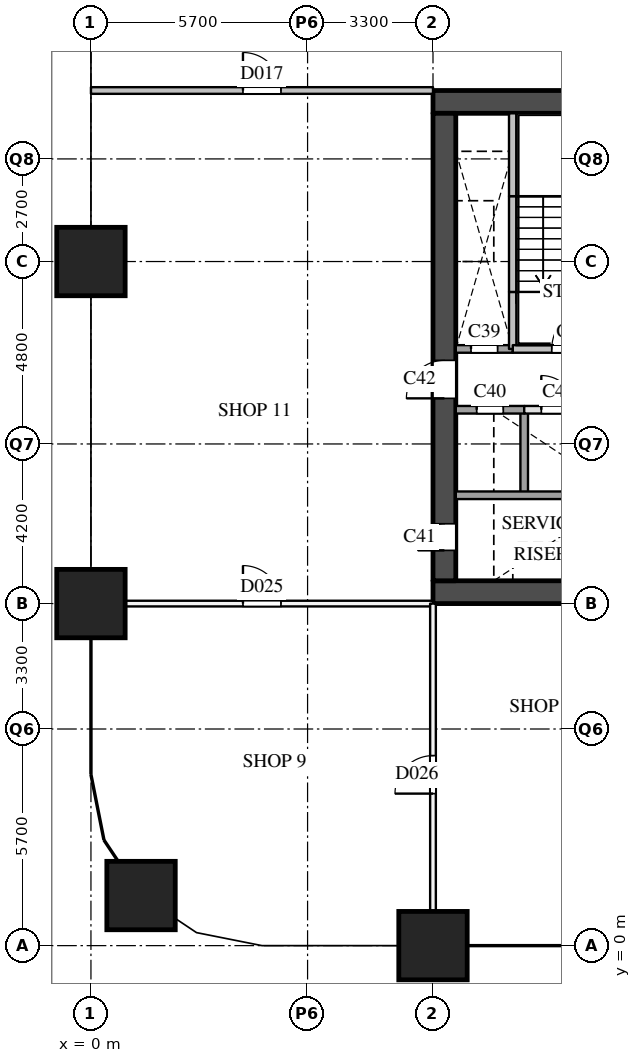
"""IFC4 building model, lengths in metres.
Left out: names, types, materials, properties, quantities, classifications, styles, units other than length and angle.
Written with IfcOpenShell. Run it as: python <this file> out.ifc"""

import sys

from ifc_helpers import new_model, si_unit, direction, frame, frame_2d, origin, origin_2d, place, context, subcontext, project, spatial, rectangle, extrude, element, fill, save


model = new_model("IFC4")
c1 = context("Model", 3, precision=1e-05, world=origin(), true_north=direction((0.0, 1.0)))
c2 = subcontext(c1, "Body", "Model", "MODEL_VIEW")
j1 = project(units=[si_unit("LENGTHUNIT", "METRE"), si_unit("PLANEANGLEUNIT", "RADIAN")], contexts=[c1])
p1 = place(None, origin())
s1 = spatial("IfcSite", under=j1, at=p1, CompositionType="ELEMENT")
p2 = place(p1, origin())
s2 = spatial("IfcBuilding", under=s1, at=p2, CompositionType="ELEMENT")
p3 = place(p2, frame((0.0, 0.0, 14.0)))
s3 = spatial("IfcBuildingStorey", under=s2, at=p3, CompositionType="ELEMENT", Elevation=14.0)
for number, where, z_axis, x_axis in (
    (1, (1.318, 1.318, 0.0), (0.0, 0.0, 1.0), (1.0, 0.0, 0.0)),
    (2, (0.0, 9.0, 0.0), (0.0, 0.0, 1.0), (1.0, 0.0, 0.0)),
    (3, (0.0, 18.0, 0.0), (0.0, 0.0, 1.0), (1.0, 0.0, 0.0)),
    (4, (9.0, 0.0, 0.0), (0.0, 0.0, 1.0), (1.0, 0.0, 0.0)),
):
    element("IfcColumn", number, at=place(p3, frame(where, z_axis=z_axis, x_axis=x_axis)), inside=s3, PredefinedType="COLUMN", context=c2, shape_type="SweptSolid", body=[
        extrude(rectangle(XDim=1.8, YDim=1.8, at=origin_2d()), origin(), (0.0, 0.0, 1.0), 7.0),
    ])
for number, where, z_axis, x_axis in (
    (5, (9.0, 9.3, 0.0), (0.0, 0.0, 1.0), (1.0, 0.0, 0.0)),
    (6, (9.0, 22.2, 0.0), (0.0, 0.0, 1.0), (1.0, 0.0, 0.0)),
):
    element("IfcWall", number, at=place(p3, frame(where, z_axis=z_axis, x_axis=x_axis)), inside=s3, PredefinedType="SHEAR", context=c2, shape_type="SweptSolid", body=[
        extrude(rectangle(XDim=9.0, YDim=0.6, at=frame_2d((4.5, 0.0))), origin(), (0.0, 0.0, 1.0), 6.59),
    ])
p4 = place(p3, frame((9.3, 9.6, 0.0), z_axis=(0.0, 0.0, 1.0), x_axis=(0.0, 1.0, 0.0)))
e7 = element("IfcWall", 7, at=p4, inside=s3, PredefinedType="SHEAR", context=c2, shape_type="SweptSolid", body=[
    extrude(rectangle(XDim=12.3, YDim=0.6, at=frame_2d((6.15, 0.0))), origin(), (0.0, 0.0, 1.0), 6.59),
])
p5 = place(p4, frame((0.8, 0.0, 0.0)))
e8 = element("IfcOpeningElement", 8, at=p5, cuts=e7, PredefinedType="OPENING", context=c2, shape_type="SweptSolid", body=[
    extrude(rectangle(XDim=0.7, YDim=2.1, at=frame_2d((0.35, 1.05))), frame((0.0, 0.31, 0.0), z_axis=(0.0, -1.0, 0.0), x_axis=(1.0, 0.0, 0.0)), (0.0, 0.0, 1.0), 0.62),
])
p6 = place(p4, frame((4.8, 0.0, 0.0)))
e9 = element("IfcOpeningElement", 9, at=p6, cuts=e7, PredefinedType="OPENING", context=c2, shape_type="SweptSolid", body=[
    extrude(rectangle(XDim=1.0, YDim=2.1, at=frame_2d((0.5, 1.05))), frame((0.0, 0.31, 0.0), z_axis=(0.0, -1.0, 0.0), x_axis=(1.0, 0.0, 0.0)), (0.0, 0.0, 1.0), 0.62),
])
p7 = place(p3, frame((11.1, 15.7, 0.0), z_axis=(0.0, 0.0, 1.0), x_axis=(0.0, 1.0, 0.0)))
e10 = element("IfcWall", 10, at=p7, inside=s3, PredefinedType="SOLIDWALL", context=c2, shape_type="SweptSolid", body=[
    extrude(rectangle(XDim=1.5, YDim=0.2, at=frame_2d((0.75, 0.0))), origin(), (0.0, 0.0, 1.0), 6.59),
])
p8 = place(p3, frame((11.1, 17.2, 0.0), z_axis=(0.0, 0.0, 1.0), x_axis=(0.0, 1.0, 0.0)))
e11 = element("IfcWall", 11, at=p8, inside=s3, PredefinedType="SOLIDWALL", context=c2, shape_type="SweptSolid", body=[
    extrude(rectangle(XDim=2.52, YDim=0.2, at=frame_2d((1.26, 0.0))), origin(), (0.0, 0.0, 1.0), 6.59),
])
p9 = place(p3, frame((11.1, 19.72, 0.0), z_axis=(0.0, 0.0, 1.0), x_axis=(0.0, 1.0, 0.0)))
e12 = element("IfcWall", 12, at=p9, inside=s3, PredefinedType="SOLIDWALL", context=c2, shape_type="SweptSolid", body=[
    extrude(rectangle(XDim=2.18, YDim=0.2, at=frame_2d((1.09, 0.0))), origin(), (0.0, 0.0, 1.0), 6.59),
])
p10 = place(p3, frame((11.4, 11.9, 0.0), z_axis=(0.0, 0.0, 1.0), x_axis=(0.0, 1.0, 0.0)))
e13 = element("IfcWall", 13, at=p10, inside=s3, PredefinedType="SOLIDWALL", context=c2, shape_type="SweptSolid", body=[
    extrude(rectangle(XDim=2.2, YDim=0.2, at=frame_2d((1.1, 0.0))), origin(), (0.0, 0.0, 1.0), 6.59),
])
p11 = place(p3, frame((9.6, 11.85, 0.0), z_axis=(0.0, 0.0, 1.0), x_axis=(1.0, 0.0, 0.0)))
e14 = element("IfcWall", 14, at=p11, inside=s3, PredefinedType="SOLIDWALL", context=c2, shape_type="SweptSolid", body=[
    extrude(rectangle(XDim=7.8, YDim=0.2, at=frame_2d((3.9, 0.0))), origin(), (0.0, 0.0, 1.0), 6.59),
])
p12 = place(p3, frame((11.4, 14.1, 0.0), z_axis=(0.0, 0.0, 1.0), x_axis=(1.0, 0.0, 0.0)))
e15 = element("IfcWall", 15, at=p12, inside=s3, PredefinedType="PARTITIONING", context=c2, shape_type="SweptSolid", body=[
    extrude(rectangle(XDim=6.0, YDim=0.2, at=frame_2d((3.0, 0.0))), origin(), (0.0, 0.0, 1.0), 6.59),
])
p13 = place(p12, frame((0.45, 0.0, 0.0)))
e16 = element("IfcOpeningElement", 16, at=p13, cuts=e15, PredefinedType="OPENING", context=c2, shape_type="SweptSolid", body=[
    extrude(rectangle(XDim=0.9, YDim=2.1, at=frame_2d((0.45, 1.05))), frame((0.0, 0.11, 0.0), z_axis=(0.0, -1.0, 0.0), x_axis=(1.0, 0.0, 0.0)), (0.0, 0.0, 1.0), 0.22),
])
p14 = place(p12, frame((3.45, 0.0, 0.0)))
e17 = element("IfcOpeningElement", 17, at=p14, cuts=e15, PredefinedType="OPENING", context=c2, shape_type="SweptSolid", body=[
    extrude(rectangle(XDim=0.9, YDim=2.1, at=frame_2d((0.45, 1.05))), frame((0.0, 0.11, 0.0), z_axis=(0.0, -1.0, 0.0), x_axis=(1.0, 0.0, 0.0)), (0.0, 0.0, 1.0), 0.22),
])
p15 = place(p3, frame((9.6, 14.1, 0.0), z_axis=(0.0, 0.0, 1.0), x_axis=(1.0, 0.0, 0.0)))
e18 = element("IfcWall", 18, at=p15, inside=s3, PredefinedType="SOLIDWALL", context=c2, shape_type="SweptSolid", body=[
    extrude(rectangle(XDim=1.8, YDim=0.2, at=frame_2d((0.9, 0.0))), origin(), (0.0, 0.0, 1.0), 6.59),
])
p16 = place(p15, frame((0.55, 0.0, 0.0)))
e19 = element("IfcOpeningElement", 19, at=p16, cuts=e18, PredefinedType="OPENING", context=c2, shape_type="SweptSolid", body=[
    extrude(rectangle(XDim=0.7, YDim=2.1, at=frame_2d((0.35, 1.05))), frame((0.0, 0.11, 0.0), z_axis=(0.0, -1.0, 0.0), x_axis=(1.0, 0.0, 0.0)), (0.0, 0.0, 1.0), 0.22),
])
p17 = place(p3, frame((9.6, 15.7, 0.0), z_axis=(0.0, 0.0, 1.0), x_axis=(1.0, 0.0, 0.0)))
e20 = element("IfcWall", 20, at=p17, inside=s3, PredefinedType="SOLIDWALL", context=c2, shape_type="SweptSolid", body=[
    extrude(rectangle(XDim=1.5, YDim=0.2, at=frame_2d((0.75, 0.0))), origin(), (0.0, 0.0, 1.0), 6.59),
])
p18 = place(p17, frame((0.4, 0.0, 0.0)))
e21 = element("IfcOpeningElement", 21, at=p18, cuts=e20, PredefinedType="OPENING", context=c2, shape_type="SweptSolid", body=[
    extrude(rectangle(XDim=0.7, YDim=2.1, at=frame_2d((0.35, 1.05))), frame((0.0, 0.11, 0.0), z_axis=(0.0, -1.0, 0.0), x_axis=(1.0, 0.0, 0.0)), (0.0, 0.0, 1.0), 0.22),
])
p19 = place(p3, frame((11.1, 15.7, 0.0), z_axis=(0.0, 0.0, 1.0), x_axis=(1.0, 0.0, 0.0)))
e22 = element("IfcWall", 22, at=p19, inside=s3, PredefinedType="SOLIDWALL", context=c2, shape_type="SweptSolid", body=[
    extrude(rectangle(XDim=3.05, YDim=0.2, at=frame_2d((1.525, 0.0))), origin(), (0.0, 0.0, 1.0), 6.59),
])
p20 = place(p19, frame((1.025, 0.0, 0.0)))
e23 = element("IfcOpeningElement", 23, at=p20, cuts=e22, PredefinedType="OPENING", context=c2, shape_type="SweptSolid", body=[
    extrude(rectangle(XDim=1.1, YDim=2.1, at=frame_2d((0.55, 1.05))), frame((0.0, 0.11, 0.0), z_axis=(0.0, -1.0, 0.0), x_axis=(1.0, 0.0, 0.0)), (0.0, 0.0, 1.0), 0.22),
])
p21 = place(p3, frame((0.0, 22.5, 0.0), z_axis=(0.0, 0.0, 1.0), x_axis=(1.0, 0.0, 0.0)))
e24 = element("IfcWall", 24, at=p21, inside=s3, PredefinedType="PARTITIONING", context=c2, shape_type="SweptSolid", body=[
    extrude(rectangle(XDim=9.0, YDim=0.175, at=frame_2d((4.5, 0.0))), origin(), (0.0, 0.0, 1.0), 5.59),
])
p22 = place(p21, frame((4.0, 0.0, 0.0)))
e25 = element("IfcOpeningElement", 25, at=p22, cuts=e24, PredefinedType="OPENING", context=c2, shape_type="SweptSolid", body=[
    extrude(rectangle(XDim=1.0, YDim=2.1, at=frame_2d((0.5, 1.05))), frame((0.0, 0.097, 0.0), z_axis=(0.0, -1.0, 0.0), x_axis=(1.0, 0.0, 0.0)), (0.0, 0.0, 1.0), 0.195),
])
p23 = place(p3, frame((0.0, 9.0, 0.0), z_axis=(0.0, 0.0, 1.0), x_axis=(1.0, 0.0, 0.0)))
e26 = element("IfcWall", 26, at=p23, inside=s3, PredefinedType="PARTITIONING", context=c2, shape_type="SweptSolid", body=[
    extrude(rectangle(XDim=9.0, YDim=0.15, at=frame_2d((4.5, 0.0))), origin(), (0.0, 0.0, 1.0), 6.59),
])
p24 = place(p23, frame((4.0, 0.0, 0.0)))
e27 = element("IfcOpeningElement", 27, at=p24, cuts=e26, PredefinedType="OPENING", context=c2, shape_type="SweptSolid", body=[
    extrude(rectangle(XDim=1.0, YDim=2.1, at=frame_2d((0.5, 1.05))), frame((0.0, 0.085, 0.0), z_axis=(0.0, -1.0, 0.0), x_axis=(1.0, 0.0, 0.0)), (0.0, 0.0, 1.0), 0.17),
])
p25 = place(p3, frame((9.0, 0.0, 0.0), z_axis=(0.0, 0.0, 1.0), x_axis=(0.0, 1.0, 0.0)))
e28 = element("IfcWall", 28, at=p25, inside=s3, PredefinedType="PARTITIONING", context=c2, shape_type="SweptSolid", body=[
    extrude(rectangle(XDim=9.0, YDim=0.15, at=frame_2d((4.5, 0.0))), origin(), (0.0, 0.0, 1.0), 6.59),
])
p26 = place(p25, frame((4.0, 0.0, 0.0)))
e29 = element("IfcOpeningElement", 29, at=p26, cuts=e28, PredefinedType="OPENING", context=c2, shape_type="SweptSolid", body=[
    extrude(rectangle(XDim=1.0, YDim=2.1, at=frame_2d((0.5, 1.05))), frame((0.0, 0.085, 0.0), z_axis=(0.0, -1.0, 0.0), x_axis=(1.0, 0.0, 0.0)), (0.0, 0.0, 1.0), 0.17),
])
p27 = place(p20, origin())
e30 = element("IfcDoor", 30, at=p27, inside=s3, OperationType="SINGLE_SWING_RIGHT", PredefinedType="DOOR", context=c2, shape_type="SweptSolid", body=[
    extrude(rectangle(XDim=1.1, YDim=2.1, at=frame_2d((0.55, 1.05))), frame((0.0, 0.025, 0.0), z_axis=(0.0, -1.0, 0.0), x_axis=(1.0, 0.0, 0.0)), (0.0, 0.0, 1.0), 0.05),
])
fill(e23, e30)
p28 = place(p18, origin())
e31 = element("IfcDoor", 31, at=p28, inside=s3, OperationType="SINGLE_SWING_LEFT", PredefinedType="DOOR", context=c2, shape_type="SweptSolid", body=[
    extrude(rectangle(XDim=0.7, YDim=2.1, at=frame_2d((0.35, 1.05))), frame((0.0, 0.025, 0.0), z_axis=(0.0, -1.0, 0.0), x_axis=(1.0, 0.0, 0.0)), (0.0, 0.0, 1.0), 0.05),
])
fill(e21, e31)
p29 = place(p16, origin())
e32 = element("IfcDoor", 32, at=p29, inside=s3, OperationType="SINGLE_SWING_LEFT", PredefinedType="DOOR", context=c2, shape_type="SweptSolid", body=[
    extrude(rectangle(XDim=0.7, YDim=2.1, at=frame_2d((0.35, 1.05))), frame((0.0, 0.025, 0.0), z_axis=(0.0, -1.0, 0.0), x_axis=(1.0, 0.0, 0.0)), (0.0, 0.0, 1.0), 0.05),
])
fill(e19, e32)
p30 = place(p5, origin())
e33 = element("IfcDoor", 33, at=p30, inside=s3, OperationType="SINGLE_SWING_LEFT", PredefinedType="DOOR", context=c2, shape_type="SweptSolid", body=[
    extrude(rectangle(XDim=0.7, YDim=2.1, at=frame_2d((0.35, 1.05))), frame((0.0, 0.025, 0.0), z_axis=(0.0, -1.0, 0.0), x_axis=(1.0, 0.0, 0.0)), (0.0, 0.0, 1.0), 0.05),
])
fill(e8, e33)
p31 = place(p6, origin())
e34 = element("IfcDoor", 34, at=p31, inside=s3, OperationType="SINGLE_SWING_LEFT", PredefinedType="DOOR", context=c2, shape_type="SweptSolid", body=[
    extrude(rectangle(XDim=1.0, YDim=2.1, at=frame_2d((0.5, 1.05))), frame((0.0, 0.025, 0.0), z_axis=(0.0, -1.0, 0.0), x_axis=(1.0, 0.0, 0.0)), (0.0, 0.0, 1.0), 0.05),
])
fill(e9, e34)
p32 = place(p13, origin())
e35 = element("IfcDoor", 35, at=p32, inside=s3, OperationType="SINGLE_SWING_LEFT", PredefinedType="DOOR", context=c2, shape_type="SweptSolid", body=[
    extrude(rectangle(XDim=0.9, YDim=2.1, at=frame_2d((0.45, 1.05))), frame((0.0, 0.025, 0.0), z_axis=(0.0, -1.0, 0.0), x_axis=(1.0, 0.0, 0.0)), (0.0, 0.0, 1.0), 0.05),
])
fill(e16, e35)
p33 = place(p22, origin())
e36 = element("IfcDoor", 36, at=p33, inside=s3, OperationType="SINGLE_SWING_LEFT", PredefinedType="DOOR", context=c2, shape_type="SweptSolid", body=[
    extrude(rectangle(XDim=1.0, YDim=2.1, at=frame_2d((0.5, 1.05))), frame((0.0, 0.025, 0.0), z_axis=(0.0, -1.0, 0.0), x_axis=(1.0, 0.0, 0.0)), (0.0, 0.0, 1.0), 0.05),
])
fill(e25, e36)
p34 = place(p24, origin())
e37 = element("IfcDoor", 37, at=p34, inside=s3, OperationType="SINGLE_SWING_LEFT", PredefinedType="DOOR", context=c2, shape_type="SweptSolid", body=[
    extrude(rectangle(XDim=1.0, YDim=2.1, at=frame_2d((0.5, 1.05))), frame((0.0, 0.025, 0.0), z_axis=(0.0, -1.0, 0.0), x_axis=(1.0, 0.0, 0.0)), (0.0, 0.0, 1.0), 0.05),
])
fill(e27, e37)
p35 = place(p26, origin())
e38 = element("IfcDoor", 38, at=p35, inside=s3, OperationType="SINGLE_SWING_LEFT", PredefinedType="DOOR", context=c2, shape_type="SweptSolid", body=[
    extrude(rectangle(XDim=1.0, YDim=2.1, at=frame_2d((0.5, 1.05))), frame((0.0, 0.025, 0.0), z_axis=(0.0, -1.0, 0.0), x_axis=(1.0, 0.0, 0.0)), (0.0, 0.0, 1.0), 0.05),
])
fill(e29, e38)
save(model, sys.argv[1])
